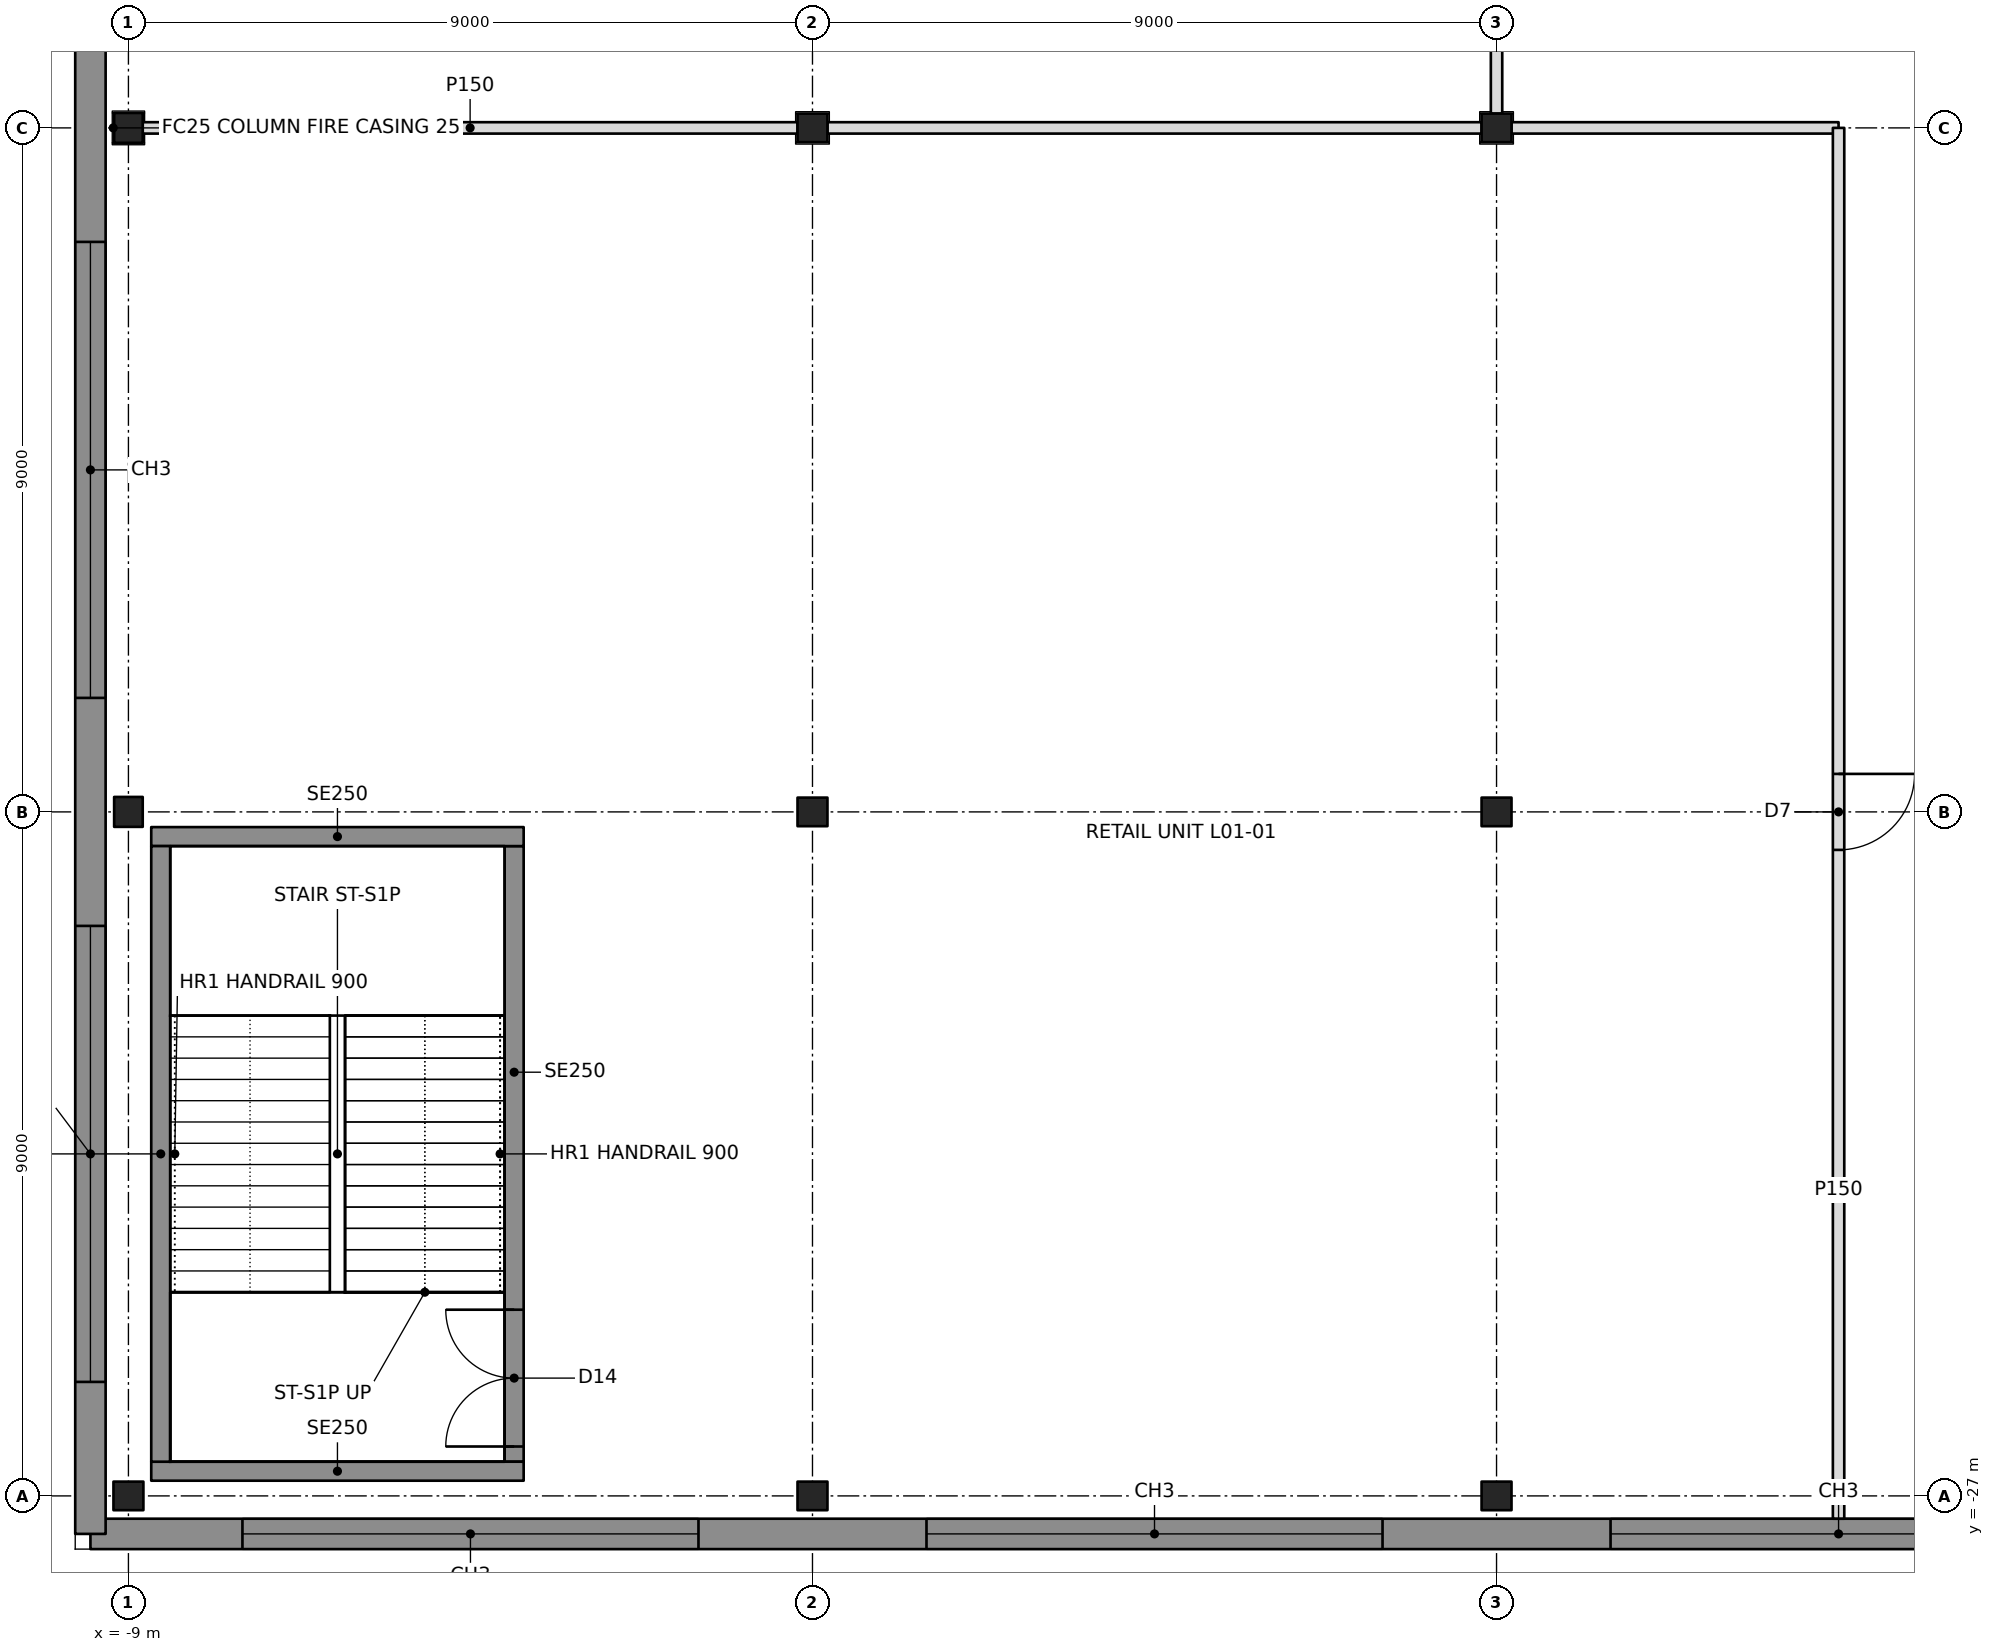
"""IFC4 building model, lengths in metres.
Left out: names, types, materials, properties, quantities, classifications, styles, units other than length and angle.
Written with IfcOpenShell. Run it as: python <this file> out.ifc"""

import sys

from ifc_helpers import new_model, si_unit, direction, frame, frame_2d, origin, origin_2d, place, context, subcontext, project, spatial, rectangle, i_section, extrude, element, fill, save


model = new_model("IFC4")
c1 = context("Model", 3, precision=1e-05, world=origin(), true_north=direction((0.0, 1.0)))
c2 = subcontext(c1, "Body", "Model", "MODEL_VIEW")
j1 = project(units=[si_unit("LENGTHUNIT", "METRE"), si_unit("PLANEANGLEUNIT", "RADIAN")], contexts=[c1])
p1 = place(None, origin())
s1 = spatial("IfcSite", under=j1, at=p1, CompositionType="ELEMENT")
p2 = place(p1, origin())
s2 = spatial("IfcBuilding", under=s1, at=p2, CompositionType="ELEMENT")
p3 = place(p2, frame((0.0, 0.0, 6.0)))
s3 = spatial("IfcBuildingStorey", under=s2, at=p3, CompositionType="ELEMENT", Elevation=6.0)
for number, where, z_axis, x_axis in (
    (1, (-9.0, -27.0, 0.0), (0.0, 0.0, 1.0), (1.0, 0.0, 0.0)),
    (2, (-9.0, -18.0, 0.0), (0.0, 0.0, 1.0), (0.0, 1.0, 0.0)),
    (3, (-9.0, -9.0, 0.0), (0.0, 0.0, 1.0), (0.0, 1.0, 0.0)),
    (4, (0.0, -27.0, 0.0), (0.0, 0.0, 1.0), (1.0, 0.0, 0.0)),
    (5, (0.0, -18.0, 0.0), (0.0, 0.0, 1.0), (1.0, 0.0, 0.0)),
    (6, (0.0, -9.0, 0.0), (0.0, 0.0, 1.0), (1.0, 0.0, 0.0)),
    (7, (9.0, -27.0, 0.0), (0.0, 0.0, 1.0), (1.0, 0.0, 0.0)),
    (8, (9.0, -18.0, 0.0), (0.0, 0.0, 1.0), (1.0, 0.0, 0.0)),
    (9, (9.0, -9.0, 0.0), (0.0, 0.0, 1.0), (1.0, 0.0, 0.0)),
):
    element("IfcColumn", number, at=place(p3, frame(where, z_axis=z_axis, x_axis=x_axis)), inside=s3, PredefinedType="COLUMN", context=c2, shape_type="SweptSolid", body=[
        extrude(i_section(OverallWidth=0.394, OverallDepth=0.376, WebThickness=0.017, FlangeThickness=0.028, at=origin_2d()), origin(), (0.0, 0.0, 1.0), 5.0),
    ])
p4 = place(p3, frame((-9.5, -27.5, 0.0), z_axis=(0.0, 0.0, 1.0), x_axis=(1.0, 0.0, 0.0)))
e10 = element("IfcWall", 10, at=p4, inside=s3, PredefinedType="SOLIDWALL", context=c2, shape_type="SweptSolid", body=[
    extrude(rectangle(XDim=73.0, YDim=0.4, at=frame_2d((36.5, 0.0))), origin(), (0.0, 0.0, 1.0), 4.75),
])
p5 = place(p4, frame((2.0, 0.0, 0.9)))
e11 = element("IfcOpeningElement", 11, at=p5, cuts=e10, PredefinedType="OPENING", context=c2, shape_type="SweptSolid", body=[
    extrude(rectangle(XDim=6.0, YDim=2.6, at=frame_2d((3.0, 1.3))), frame((0.0, 0.21, 0.0), z_axis=(0.0, -1.0, 0.0), x_axis=(1.0, 0.0, 0.0)), (0.0, 0.0, 1.0), 0.42),
])
p6 = place(p4, frame((11.0, 0.0, 0.9)))
e12 = element("IfcOpeningElement", 12, at=p6, cuts=e10, PredefinedType="OPENING", context=c2, shape_type="SweptSolid", body=[
    extrude(rectangle(XDim=6.0, YDim=2.6, at=frame_2d((3.0, 1.3))), frame((0.0, 0.21, 0.0), z_axis=(0.0, -1.0, 0.0), x_axis=(1.0, 0.0, 0.0)), (0.0, 0.0, 1.0), 0.42),
])
p7 = place(p4, frame((20.0, 0.0, 0.9)))
e13 = element("IfcOpeningElement", 13, at=p7, cuts=e10, PredefinedType="OPENING", context=c2, shape_type="SweptSolid", body=[
    extrude(rectangle(XDim=6.0, YDim=2.6, at=frame_2d((3.0, 1.3))), frame((0.0, 0.21, 0.0), z_axis=(0.0, -1.0, 0.0), x_axis=(1.0, 0.0, 0.0)), (0.0, 0.0, 1.0), 0.42),
])
p8 = place(p4, frame((29.0, 0.0, 0.9)))
e14 = element("IfcOpeningElement", 14, at=p8, cuts=e10, PredefinedType="OPENING", context=c2, shape_type="SweptSolid", body=[
    extrude(rectangle(XDim=6.0, YDim=2.6, at=frame_2d((3.0, 1.3))), frame((0.0, 0.21, 0.0), z_axis=(0.0, -1.0, 0.0), x_axis=(1.0, 0.0, 0.0)), (0.0, 0.0, 1.0), 0.42),
])
p9 = place(p4, frame((38.0, 0.0, 0.9)))
e15 = element("IfcOpeningElement", 15, at=p9, cuts=e10, PredefinedType="OPENING", context=c2, shape_type="SweptSolid", body=[
    extrude(rectangle(XDim=6.0, YDim=2.6, at=frame_2d((3.0, 1.3))), frame((0.0, 0.21, 0.0), z_axis=(0.0, -1.0, 0.0), x_axis=(1.0, 0.0, 0.0)), (0.0, 0.0, 1.0), 0.42),
])
p10 = place(p4, frame((47.0, 0.0, 0.9)))
e16 = element("IfcOpeningElement", 16, at=p10, cuts=e10, PredefinedType="OPENING", context=c2, shape_type="SweptSolid", body=[
    extrude(rectangle(XDim=6.0, YDim=2.6, at=frame_2d((3.0, 1.3))), frame((0.0, 0.21, 0.0), z_axis=(0.0, -1.0, 0.0), x_axis=(1.0, 0.0, 0.0)), (0.0, 0.0, 1.0), 0.42),
])
p11 = place(p4, frame((56.0, 0.0, 0.9)))
e17 = element("IfcOpeningElement", 17, at=p11, cuts=e10, PredefinedType="OPENING", context=c2, shape_type="SweptSolid", body=[
    extrude(rectangle(XDim=6.0, YDim=2.6, at=frame_2d((3.0, 1.3))), frame((0.0, 0.21, 0.0), z_axis=(0.0, -1.0, 0.0), x_axis=(1.0, 0.0, 0.0)), (0.0, 0.0, 1.0), 0.42),
])
p12 = place(p4, frame((65.0, 0.0, 0.9)))
e18 = element("IfcOpeningElement", 18, at=p12, cuts=e10, PredefinedType="OPENING", context=c2, shape_type="SweptSolid", body=[
    extrude(rectangle(XDim=6.0, YDim=2.6, at=frame_2d((3.0, 1.3))), frame((0.0, 0.21, 0.0), z_axis=(0.0, -1.0, 0.0), x_axis=(1.0, 0.0, 0.0)), (0.0, 0.0, 1.0), 0.42),
])
p13 = place(p3, frame((-9.5, 45.5, 0.0), z_axis=(0.0, 0.0, 1.0), x_axis=(0.0, -1.0, 0.0)))
e19 = element("IfcWall", 19, at=p13, inside=s3, PredefinedType="SOLIDWALL", context=c2, shape_type="SweptSolid", body=[
    extrude(rectangle(XDim=73.0, YDim=0.4, at=frame_2d((36.5, 0.0))), origin(), (0.0, 0.0, 1.0), 4.75),
])
p14 = place(p13, frame((2.0, 0.0, 0.9)))
e20 = element("IfcOpeningElement", 20, at=p14, cuts=e19, PredefinedType="OPENING", context=c2, shape_type="SweptSolid", body=[
    extrude(rectangle(XDim=6.0, YDim=2.6, at=frame_2d((3.0, 1.3))), frame((0.0, 0.21, 0.0), z_axis=(0.0, -1.0, 0.0), x_axis=(1.0, 0.0, 0.0)), (0.0, 0.0, 1.0), 0.42),
])
p15 = place(p13, frame((11.0, 0.0, 0.9)))
e21 = element("IfcOpeningElement", 21, at=p15, cuts=e19, PredefinedType="OPENING", context=c2, shape_type="SweptSolid", body=[
    extrude(rectangle(XDim=6.0, YDim=2.6, at=frame_2d((3.0, 1.3))), frame((0.0, 0.21, 0.0), z_axis=(0.0, -1.0, 0.0), x_axis=(1.0, 0.0, 0.0)), (0.0, 0.0, 1.0), 0.42),
])
p16 = place(p13, frame((20.0, 0.0, 0.9)))
e22 = element("IfcOpeningElement", 22, at=p16, cuts=e19, PredefinedType="OPENING", context=c2, shape_type="SweptSolid", body=[
    extrude(rectangle(XDim=6.0, YDim=2.6, at=frame_2d((3.0, 1.3))), frame((0.0, 0.21, 0.0), z_axis=(0.0, -1.0, 0.0), x_axis=(1.0, 0.0, 0.0)), (0.0, 0.0, 1.0), 0.42),
])
p17 = place(p13, frame((29.0, 0.0, 0.9)))
e23 = element("IfcOpeningElement", 23, at=p17, cuts=e19, PredefinedType="OPENING", context=c2, shape_type="SweptSolid", body=[
    extrude(rectangle(XDim=6.0, YDim=2.6, at=frame_2d((3.0, 1.3))), frame((0.0, 0.21, 0.0), z_axis=(0.0, -1.0, 0.0), x_axis=(1.0, 0.0, 0.0)), (0.0, 0.0, 1.0), 0.42),
])
p18 = place(p13, frame((38.0, 0.0, 0.9)))
e24 = element("IfcOpeningElement", 24, at=p18, cuts=e19, PredefinedType="OPENING", context=c2, shape_type="SweptSolid", body=[
    extrude(rectangle(XDim=6.0, YDim=2.6, at=frame_2d((3.0, 1.3))), frame((0.0, 0.21, 0.0), z_axis=(0.0, -1.0, 0.0), x_axis=(1.0, 0.0, 0.0)), (0.0, 0.0, 1.0), 0.42),
])
p19 = place(p13, frame((47.0, 0.0, 0.9)))
e25 = element("IfcOpeningElement", 25, at=p19, cuts=e19, PredefinedType="OPENING", context=c2, shape_type="SweptSolid", body=[
    extrude(rectangle(XDim=6.0, YDim=2.6, at=frame_2d((3.0, 1.3))), frame((0.0, 0.21, 0.0), z_axis=(0.0, -1.0, 0.0), x_axis=(1.0, 0.0, 0.0)), (0.0, 0.0, 1.0), 0.42),
])
p20 = place(p13, frame((56.0, 0.0, 0.9)))
e26 = element("IfcOpeningElement", 26, at=p20, cuts=e19, PredefinedType="OPENING", context=c2, shape_type="SweptSolid", body=[
    extrude(rectangle(XDim=6.0, YDim=2.6, at=frame_2d((3.0, 1.3))), frame((0.0, 0.21, 0.0), z_axis=(0.0, -1.0, 0.0), x_axis=(1.0, 0.0, 0.0)), (0.0, 0.0, 1.0), 0.42),
])
p21 = place(p13, frame((65.0, 0.0, 0.9)))
e27 = element("IfcOpeningElement", 27, at=p21, cuts=e19, PredefinedType="OPENING", context=c2, shape_type="SweptSolid", body=[
    extrude(rectangle(XDim=6.0, YDim=2.6, at=frame_2d((3.0, 1.3))), frame((0.0, 0.21, 0.0), z_axis=(0.0, -1.0, 0.0), x_axis=(1.0, 0.0, 0.0)), (0.0, 0.0, 1.0), 0.42),
])
p22 = place(p3, frame((-8.812, -9.0, 0.0), z_axis=(0.0, 0.0, 1.0), x_axis=(1.0, 0.0, 0.0)))
e28 = element("IfcWall", 28, at=p22, inside=s3, PredefinedType="PARTITIONING", context=c2, shape_type="SweptSolid", body=[
    extrude(rectangle(XDim=8.615, YDim=0.15, at=frame_2d((4.308, 0.0))), origin(), (0.0, 0.0, 1.0), 3.892),
])
p23 = place(p3, frame((0.197, -9.0, 0.0), z_axis=(0.0, 0.0, 1.0), x_axis=(1.0, 0.0, 0.0)))
e29 = element("IfcWall", 29, at=p23, inside=s3, PredefinedType="PARTITIONING", context=c2, shape_type="SweptSolid", body=[
    extrude(rectangle(XDim=8.606, YDim=0.15, at=frame_2d((4.303, 0.0))), origin(), (0.0, 0.0, 1.0), 3.892),
])
p24 = place(p3, frame((9.197, -9.0, 0.0), z_axis=(0.0, 0.0, 1.0), x_axis=(1.0, 0.0, 0.0)))
e30 = element("IfcWall", 30, at=p24, inside=s3, PredefinedType="PARTITIONING", context=c2, shape_type="SweptSolid", body=[
    extrude(rectangle(XDim=4.303, YDim=0.15, at=frame_2d((2.152, 0.0))), origin(), (0.0, 0.0, 1.0), 3.892),
])
p25 = place(p3, frame((9.0, -0.4, 0.0), z_axis=(0.0, 0.0, 1.0), x_axis=(0.0, -1.0, 0.0)))
e31 = element("IfcWall", 31, at=p25, inside=s3, PredefinedType="PARTITIONING", context=c2, shape_type="SweptSolid", body=[
    extrude(rectangle(XDim=8.412, YDim=0.15, at=frame_2d((4.206, 0.0))), origin(), (0.0, 0.0, 1.0), 3.892),
])
p26 = place(p3, frame((13.5, -9.0, 0.0), z_axis=(0.0, 0.0, 1.0), x_axis=(0.0, -1.0, 0.0)))
e32 = element("IfcWall", 32, at=p26, inside=s3, PredefinedType="PARTITIONING", context=c2, shape_type="SweptSolid", body=[
    extrude(rectangle(XDim=18.3, YDim=0.15, at=frame_2d((9.15, 0.0))), origin(), (0.0, 0.0, 1.0), 3.891),
])
p27 = place(p26, frame((8.5, 0.0, 0.0)))
e33 = element("IfcOpeningElement", 33, at=p27, cuts=e32, PredefinedType="OPENING", context=c2, shape_type="SweptSolid", body=[
    extrude(rectangle(XDim=1.0, YDim=2.1, at=frame_2d((0.5, 1.05))), frame((0.0, 0.085, 0.0), z_axis=(0.0, -1.0, 0.0), x_axis=(1.0, 0.0, 0.0)), (0.0, 0.0, 1.0), 0.17),
])
for number, where, z_axis, x_axis in (
    (34, (-8.7, -26.675, 0.0), (0.0, 0.0, 1.0), (1.0, 0.0, 0.0)),
    (35, (-8.7, -18.325, 0.0), (0.0, 0.0, 1.0), (1.0, 0.0, 0.0)),
):
    element("IfcWall", number, at=place(p3, frame(where, z_axis=z_axis, x_axis=x_axis)), inside=s3, PredefinedType="SOLIDWALL", context=c2, shape_type="SweptSolid", body=[
        extrude(rectangle(XDim=4.9, YDim=0.25, at=frame_2d((2.45, 0.0))), origin(), (0.0, 0.0, 1.0), 4.75),
    ])
p28 = place(p3, frame((-8.575, -26.55, 0.0), z_axis=(0.0, 0.0, 1.0), x_axis=(0.0, 1.0, 0.0)))
e36 = element("IfcWall", 36, at=p28, inside=s3, PredefinedType="SOLIDWALL", context=c2, shape_type="SweptSolid", body=[
    extrude(rectangle(XDim=8.1, YDim=0.25, at=frame_2d((4.05, 0.0))), origin(), (0.0, 0.0, 1.0), 4.75),
])
p29 = place(p3, frame((-3.925, -26.55, 0.0), z_axis=(0.0, 0.0, 1.0), x_axis=(0.0, 1.0, 0.0)))
e37 = element("IfcWall", 37, at=p29, inside=s3, PredefinedType="SOLIDWALL", context=c2, shape_type="SweptSolid", body=[
    extrude(rectangle(XDim=8.1, YDim=0.25, at=frame_2d((4.05, 0.0))), origin(), (0.0, 0.0, 1.0), 4.75),
])
p30 = place(p29, frame((0.2, 0.0, 0.0)))
e38 = element("IfcOpeningElement", 38, at=p30, cuts=e37, PredefinedType="OPENING", context=c2, shape_type="SweptSolid", body=[
    extrude(rectangle(XDim=1.8, YDim=2.1, at=frame_2d((0.9, 1.05))), frame((0.0, 0.135, 0.0), z_axis=(0.0, -1.0, 0.0), x_axis=(1.0, 0.0, 0.0)), (0.0, 0.0, 1.0), 0.27),
])
p31 = place(p5, origin())
e39 = element("IfcWindow", 39, at=p31, inside=s3, PartitioningType="TRIPLE_PANEL_VERTICAL", PredefinedType="WINDOW", context=c2, shape_type="SweptSolid", body=[
    extrude(rectangle(XDim=6.0, YDim=2.6, at=frame_2d((3.0, 1.3))), frame((0.0, 0.03, 0.0), z_axis=(0.0, -1.0, 0.0), x_axis=(1.0, 0.0, 0.0)), (0.0, 0.0, 1.0), 0.06),
])
fill(e11, e39)
p32 = place(p6, origin())
e40 = element("IfcWindow", 40, at=p32, inside=s3, PartitioningType="TRIPLE_PANEL_VERTICAL", PredefinedType="WINDOW", context=c2, shape_type="SweptSolid", body=[
    extrude(rectangle(XDim=6.0, YDim=2.6, at=frame_2d((3.0, 1.3))), frame((0.0, 0.03, 0.0), z_axis=(0.0, -1.0, 0.0), x_axis=(1.0, 0.0, 0.0)), (0.0, 0.0, 1.0), 0.06),
])
fill(e12, e40)
p33 = place(p7, origin())
e41 = element("IfcWindow", 41, at=p33, inside=s3, PartitioningType="TRIPLE_PANEL_VERTICAL", PredefinedType="WINDOW", context=c2, shape_type="SweptSolid", body=[
    extrude(rectangle(XDim=6.0, YDim=2.6, at=frame_2d((3.0, 1.3))), frame((0.0, 0.03, 0.0), z_axis=(0.0, -1.0, 0.0), x_axis=(1.0, 0.0, 0.0)), (0.0, 0.0, 1.0), 0.06),
])
fill(e13, e41)
p34 = place(p20, origin())
e42 = element("IfcWindow", 42, at=p34, inside=s3, PartitioningType="TRIPLE_PANEL_VERTICAL", PredefinedType="WINDOW", context=c2, shape_type="SweptSolid", body=[
    extrude(rectangle(XDim=6.0, YDim=2.6, at=frame_2d((3.0, 1.3))), frame((0.0, 0.03, 0.0), z_axis=(0.0, -1.0, 0.0), x_axis=(1.0, 0.0, 0.0)), (0.0, 0.0, 1.0), 0.06),
])
fill(e26, e42)
p35 = place(p21, origin())
e43 = element("IfcWindow", 43, at=p35, inside=s3, PartitioningType="TRIPLE_PANEL_VERTICAL", PredefinedType="WINDOW", context=c2, shape_type="SweptSolid", body=[
    extrude(rectangle(XDim=6.0, YDim=2.6, at=frame_2d((3.0, 1.3))), frame((0.0, 0.03, 0.0), z_axis=(0.0, -1.0, 0.0), x_axis=(1.0, 0.0, 0.0)), (0.0, 0.0, 1.0), 0.06),
])
fill(e27, e43)
p36 = place(p27, origin())
e44 = element("IfcDoor", 44, at=p36, inside=s3, OperationType="SINGLE_SWING_LEFT", PredefinedType="DOOR", context=c2, shape_type="SweptSolid", body=[
    extrude(rectangle(XDim=1.0, YDim=2.1, at=frame_2d((0.5, 1.05))), frame((0.0, 0.025, 0.0), z_axis=(0.0, -1.0, 0.0), x_axis=(1.0, 0.0, 0.0)), (0.0, 0.0, 1.0), 0.05),
])
fill(e33, e44)
p37 = place(p30, origin())
e45 = element("IfcDoor", 45, at=p37, inside=s3, OperationType="DOUBLE_DOOR_SINGLE_SWING", PredefinedType="DOOR", context=c2, shape_type="SweptSolid", body=[
    extrude(rectangle(XDim=1.8, YDim=2.1, at=frame_2d((0.9, 1.05))), frame((0.0, 0.025, 0.0), z_axis=(0.0, -1.0, 0.0), x_axis=(1.0, 0.0, 0.0)), (0.0, 0.0, 1.0), 0.05),
])
fill(e38, e45)
save(model, sys.argv[1])
